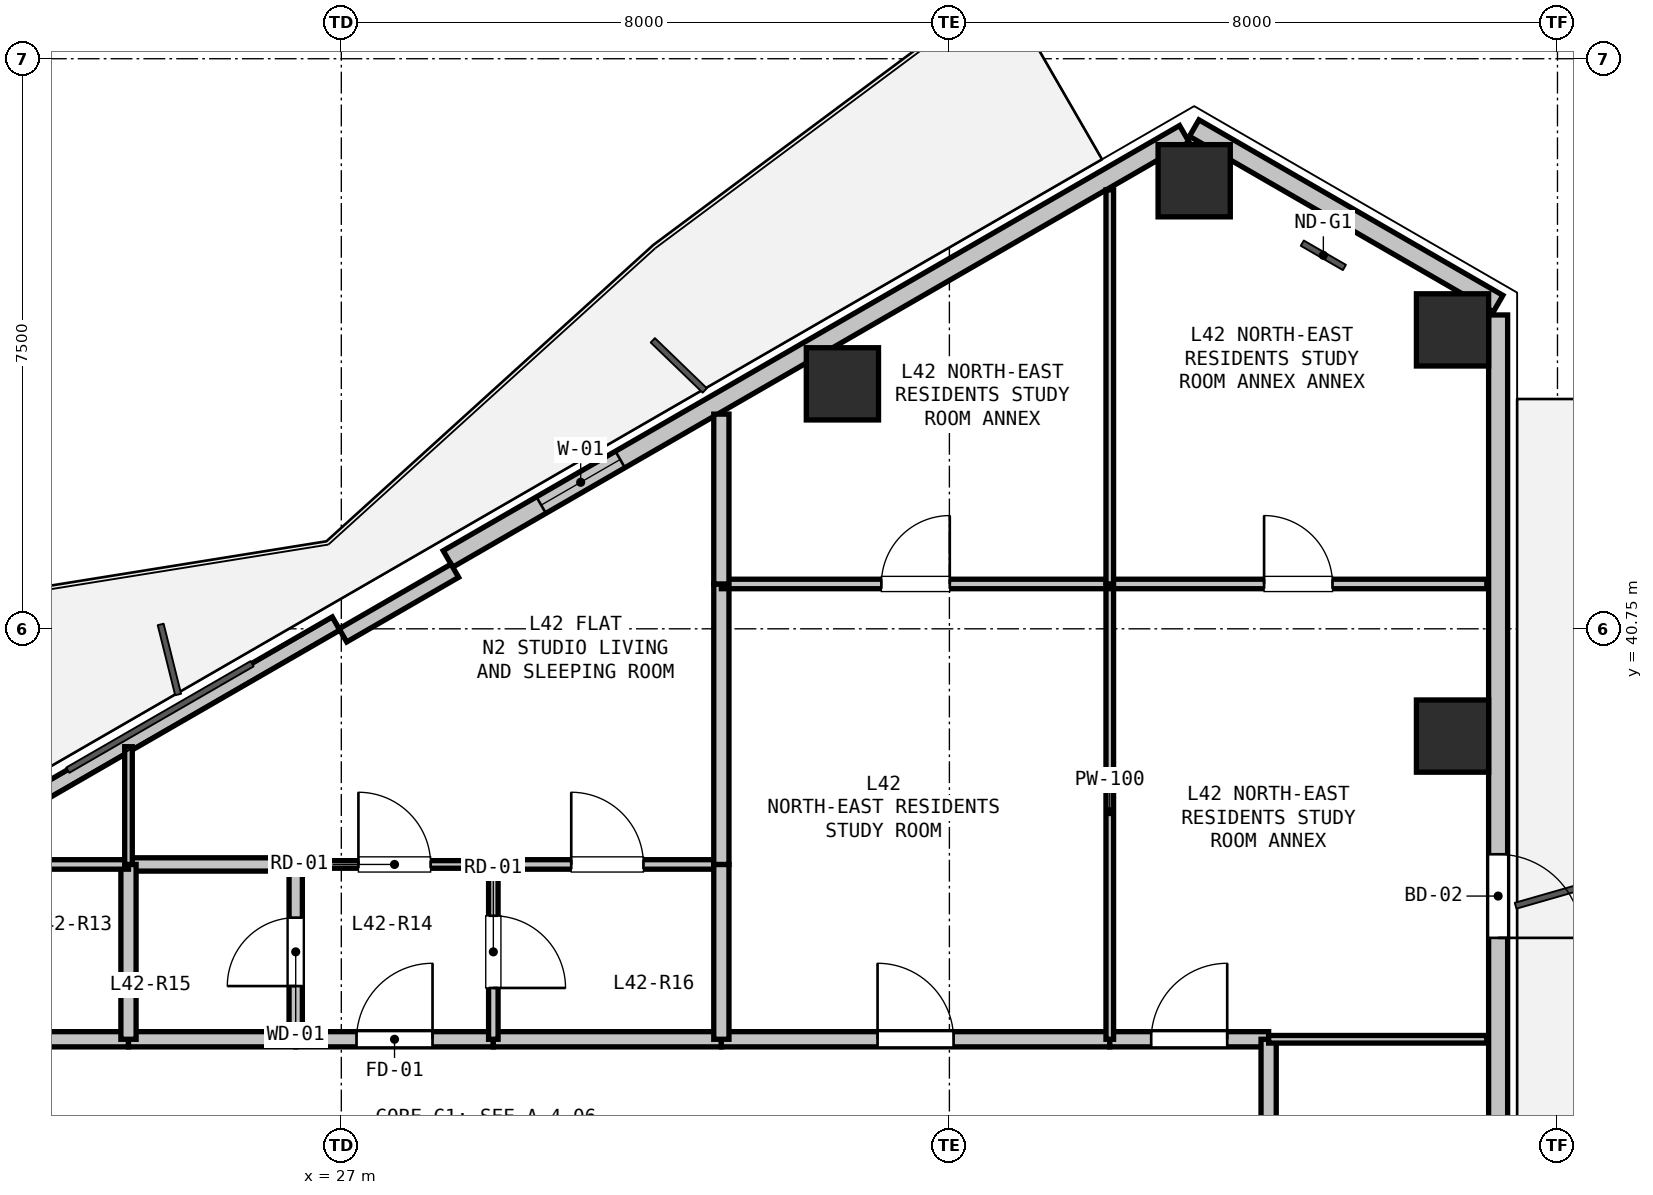
"""IFC4 building model, lengths in metres.
Left out: names, types, materials, properties, quantities, classifications, styles, units other than length and angle.
Written with IfcOpenShell. Run it as: python <this file> out.ifc"""

import sys

from ifc_helpers import new_model, si_unit, direction, frame, frame_2d, origin, origin_2d, place, context, subcontext, project, spatial, rectangle, hollow_rectangle, extrude, element, fill, save


model = new_model("IFC4")
c1 = context("Model", 3, precision=1e-05, world=origin(), true_north=direction((0.0, 1.0)))
c2 = subcontext(c1, "Body", "Model", "MODEL_VIEW")
j1 = project(units=[si_unit("LENGTHUNIT", "METRE"), si_unit("PLANEANGLEUNIT", "RADIAN")], contexts=[c1])
p1 = place(None, origin())
s1 = spatial("IfcSite", under=j1, at=p1, CompositionType="ELEMENT")
p2 = place(p1, origin())
s2 = spatial("IfcBuilding", under=s1, at=p2, CompositionType="ELEMENT")
p3 = place(p2, frame((0.0, 0.0, 150.9)))
s3 = spatial("IfcBuildingStorey", under=s2, at=p3, CompositionType="ELEMENT", Elevation=150.9)
for number, where, z_axis, x_axis in (
    (1, (33.593, 43.973, 0.0), (0.0, 0.0, 1.0), (1.0, 0.0, 0.0)),
    (2, (38.22, 46.645, 0.0), (0.0, 0.0, 1.0), (1.0, 0.0, 0.0)),
    (3, (41.619, 44.683, 0.0), (0.0, 0.0, 1.0), (1.0, 0.0, 0.0)),
    (4, (41.619, 39.339, 0.0), (0.0, 0.0, 1.0), (1.0, 0.0, 0.0)),
):
    element("IfcColumn", number, at=place(p3, frame(where, z_axis=z_axis, x_axis=x_axis)), inside=s3, PredefinedType="COLUMN", context=c2, shape_type="SweptSolid", body=[
        extrude(hollow_rectangle(XDim=0.95, YDim=0.95, WallThickness=0.028, at=origin_2d()), origin(), (0.0, 0.0, 1.0), 3.3),
    ])
p4 = place(p3, frame((38.22, 47.338, 0.0), z_axis=(0.0, 0.0, 1.0), x_axis=(0.866035021055, -0.499983342029, 0.0)))
e5 = element("IfcWall", 5, at=p4, inside=s3, PredefinedType="SOLIDWALL", context=c2, shape_type="SweptSolid", body=[
    extrude(rectangle(XDim=4.617, YDim=0.25, at=frame_2d((2.309, 0.0))), origin(), (0.0, 0.0, 1.0), 2.68),
])
p5 = place(p3, frame((17.85, 35.577, 0.0), z_axis=(0.0, 0.0, 1.0), x_axis=(0.866026619769, 0.499997893847, 0.0)))
e6 = element("IfcWall", 6, at=p5, inside=s3, PredefinedType="PARAPET", context=c2, shape_type="SweptSolid", body=[
    extrude(rectangle(XDim=10.486, YDim=0.2, at=frame_2d((5.243, 0.0))), origin(), (0.0, 0.0, 1.0), 0.2),
])
p6 = place(p3, frame((28.403, 41.67, 0.0), z_axis=(0.0, 0.0, 1.0), x_axis=(0.86602239209, 0.500005216371, 0.0)))
e7 = element("IfcWall", 7, at=p6, inside=s3, PredefinedType="SOLIDWALL", context=c2, shape_type="SweptSolid", body=[
    extrude(rectangle(XDim=11.186, YDim=0.25, at=frame_2d((5.593, 0.0))), origin(), (0.0, 0.0, 1.0), 2.68),
])
p7 = place(p6, frame((1.416, 0.0, 0.9)))
e8 = element("IfcOpeningElement", 8, at=p7, cuts=e7, PredefinedType="OPENING", context=c2, shape_type="SweptSolid", body=[
    extrude(rectangle(XDim=1.2, YDim=1.4, at=frame_2d((0.6, 0.7))), frame((0.0, 0.135, 0.0), z_axis=(0.0, -1.0, 0.0), x_axis=(1.0, 0.0, 0.0)), (0.0, 0.0, 1.0), 0.27),
])
p8 = place(p3, frame((27.021, 40.664, 0.0), z_axis=(0.0, 0.0, 1.0), x_axis=(0.86605165483, 0.499954529098, 0.0)))
e9 = element("IfcWall", 9, at=p8, inside=s3, PredefinedType="PARAPET", context=c2, shape_type="SweptSolid", body=[
    extrude(rectangle(XDim=1.7, YDim=0.2, at=frame_2d((0.85, 0.0))), origin(), (0.0, 0.0, 1.0), 2.68),
])
p9 = place(p3, frame((42.219, 44.879, 0.0), z_axis=(0.0, 0.0, 1.0), x_axis=(0.0, -1.0, 0.0)))
e10 = element("IfcWall", 10, at=p9, inside=s3, PredefinedType="SOLIDWALL", context=c2, shape_type="SweptSolid", body=[
    extrude(rectangle(XDim=11.186, YDim=0.25, at=frame_2d((5.593, 0.0))), origin(), (0.0, 0.0, 1.0), 2.68),
])
p10 = place(p9, frame((7.095, 0.0, 0.0)))
e11 = element("IfcOpeningElement", 11, at=p10, cuts=e10, PredefinedType="OPENING", context=c2, shape_type="SweptSolid", body=[
    extrude(rectangle(XDim=1.1, YDim=2.1, at=frame_2d((0.55, 1.05))), frame((0.0, 0.135, 0.0), z_axis=(0.0, -1.0, 0.0), x_axis=(1.0, 0.0, 0.0)), (0.0, 0.0, 1.0), 0.27),
])
p11 = place(p3, frame((21.0, 35.35, 0.0), z_axis=(0.0, 0.0, 1.0), x_axis=(1.0, 0.0, 0.0)))
e12 = element("IfcWall", 12, at=p11, inside=s3, PredefinedType="PARTITIONING", context=c2, shape_type="SweptSolid", body=[
    extrude(rectangle(XDim=3.2, YDim=0.2, at=frame_2d((1.6, 0.0))), origin(), (0.0, 0.0, 1.0), 3.06),
])
p12 = place(p11, frame((1.1, 0.0, 0.0)))
e13 = element("IfcOpeningElement", 13, at=p12, cuts=e12, PredefinedType="OPENING", context=c2, shape_type="SweptSolid", body=[
    extrude(rectangle(XDim=1.0, YDim=2.15, at=frame_2d((0.5, 1.075))), frame((0.0, 0.11, 0.0), z_axis=(0.0, -1.0, 0.0), x_axis=(1.0, 0.0, 0.0)), (0.0, 0.0, 1.0), 0.22),
])
p13 = place(p3, frame((24.2, 35.35, 0.0), z_axis=(0.0, 0.0, 1.0), x_axis=(1.0, 0.0, 0.0)))
e14 = element("IfcWall", 14, at=p13, inside=s3, PredefinedType="PARTITIONING", context=c2, shape_type="SweptSolid", body=[
    extrude(rectangle(XDim=2.2, YDim=0.2, at=frame_2d((1.1, 0.0))), origin(), (0.0, 0.0, 1.0), 3.06),
])
p14 = place(p3, frame((26.4, 35.35, 0.0), z_axis=(0.0, 0.0, 1.0), x_axis=(1.0, 0.0, 0.0)))
e15 = element("IfcWall", 15, at=p14, inside=s3, PredefinedType="PARTITIONING", context=c2, shape_type="SweptSolid", body=[
    extrude(rectangle(XDim=2.6, YDim=0.2, at=frame_2d((1.3, 0.0))), origin(), (0.0, 0.0, 1.0), 3.06),
])
p15 = place(p14, frame((0.8, 0.0, 0.0)))
e16 = element("IfcOpeningElement", 16, at=p15, cuts=e15, PredefinedType="OPENING", context=c2, shape_type="SweptSolid", body=[
    extrude(rectangle(XDim=1.0, YDim=2.15, at=frame_2d((0.5, 1.075))), frame((0.0, 0.11, 0.0), z_axis=(0.0, -1.0, 0.0), x_axis=(1.0, 0.0, 0.0)), (0.0, 0.0, 1.0), 0.22),
])
p16 = place(p3, frame((29.0, 35.35, 0.0), z_axis=(0.0, 0.0, 1.0), x_axis=(1.0, 0.0, 0.0)))
e17 = element("IfcWall", 17, at=p16, inside=s3, PredefinedType="PARTITIONING", context=c2, shape_type="SweptSolid", body=[
    extrude(rectangle(XDim=3.0, YDim=0.2, at=frame_2d((1.5, 0.0))), origin(), (0.0, 0.0, 1.0), 3.06),
])
p17 = place(p3, frame((32.0, 35.35, 0.0), z_axis=(0.0, 0.0, 1.0), x_axis=(1.0, 0.0, 0.0)))
e18 = element("IfcWall", 18, at=p17, inside=s3, PredefinedType="PARTITIONING", context=c2, shape_type="SweptSolid", body=[
    extrude(rectangle(XDim=5.11, YDim=0.2, at=frame_2d((2.555, 0.0))), origin(), (0.0, 0.0, 1.0), 2.433),
])
p18 = place(p17, frame((2.055, 0.0, 0.0)))
e19 = element("IfcOpeningElement", 19, at=p18, cuts=e18, PredefinedType="OPENING", context=c2, shape_type="SweptSolid", body=[
    extrude(rectangle(XDim=1.0, YDim=2.15, at=frame_2d((0.5, 1.075))), frame((0.0, 0.11, 0.0), z_axis=(0.0, -1.0, 0.0), x_axis=(1.0, 0.0, 0.0)), (0.0, 0.0, 1.0), 0.22),
])
p19 = place(p3, frame((37.11, 35.35, 0.0), z_axis=(0.0, 0.0, 1.0), x_axis=(1.0, 0.0, 0.0)))
e20 = element("IfcWall", 20, at=p19, inside=s3, PredefinedType="PARTITIONING", context=c2, shape_type="SweptSolid", body=[
    extrude(rectangle(XDim=2.09, YDim=0.2, at=frame_2d((1.045, 0.0))), origin(), (0.0, 0.0, 1.0), 2.433),
])
p20 = place(p19, frame((0.545, 0.0, 0.0)))
e21 = element("IfcOpeningElement", 21, at=p20, cuts=e20, PredefinedType="OPENING", context=c2, shape_type="SweptSolid", body=[
    extrude(rectangle(XDim=1.0, YDim=2.15, at=frame_2d((0.5, 1.075))), frame((0.0, 0.11, 0.0), z_axis=(0.0, -1.0, 0.0), x_axis=(1.0, 0.0, 0.0)), (0.0, 0.0, 1.0), 0.22),
])
p21 = place(p3, frame((39.2, 35.35, 0.0), z_axis=(0.0, 0.0, 1.0), x_axis=(0.0, -1.0, 0.0)))
e22 = element("IfcWall", 22, at=p21, inside=s3, PredefinedType="PARTITIONING", context=c2, shape_type="SweptSolid", body=[
    extrude(rectangle(XDim=1.75, YDim=0.2, at=frame_2d((0.875, 0.0))), origin(), (0.0, 0.0, 1.0), 3.06),
])
p22 = place(p3, frame((26.4, 37.65, 0.0), z_axis=(0.0, 0.0, 1.0), x_axis=(1.0, 0.0, 0.0)))
e23 = element("IfcWall", 23, at=p22, inside=s3, PredefinedType="PARTITIONING", context=c2, shape_type="SweptSolid", body=[
    extrude(rectangle(XDim=2.6, YDim=0.1, at=frame_2d((1.3, 0.0))), origin(), (0.0, 0.0, 1.0), 3.06),
])
p23 = place(p22, frame((0.825, 0.0, 0.0)))
e24 = element("IfcOpeningElement", 24, at=p23, cuts=e23, PredefinedType="OPENING", context=c2, shape_type="SweptSolid", body=[
    extrude(rectangle(XDim=0.95, YDim=2.1, at=frame_2d((0.475, 1.05))), frame((0.0, 0.06, 0.0), z_axis=(0.0, -1.0, 0.0), x_axis=(1.0, 0.0, 0.0)), (0.0, 0.0, 1.0), 0.12),
])
p24 = place(p3, frame((29.0, 37.65, 0.0), z_axis=(0.0, 0.0, 1.0), x_axis=(0.0, -1.0, 0.0)))
e25 = element("IfcWall", 25, at=p24, inside=s3, PredefinedType="PARTITIONING", context=c2, shape_type="SweptSolid", body=[
    extrude(rectangle(XDim=2.3, YDim=0.125, at=frame_2d((1.15, 0.0))), origin(), (0.0, 0.0, 1.0), 3.06),
])
p25 = place(p24, frame((0.675, 0.0, 0.0)))
e26 = element("IfcOpeningElement", 26, at=p25, cuts=e25, PredefinedType="OPENING", context=c2, shape_type="SweptSolid", body=[
    extrude(rectangle(XDim=0.95, YDim=2.1, at=frame_2d((0.475, 1.05))), frame((0.0, 0.073, 0.0), z_axis=(0.0, -1.0, 0.0), x_axis=(1.0, 0.0, 0.0)), (0.0, 0.0, 1.0), 0.145),
])
p26 = place(p3, frame((26.4, 35.35, 0.0), z_axis=(0.0, 0.0, 1.0), x_axis=(0.0, 1.0, 0.0)))
e27 = element("IfcWall", 27, at=p26, inside=s3, PredefinedType="PLUMBINGWALL", context=c2, shape_type="SweptSolid", body=[
    extrude(rectangle(XDim=2.3, YDim=0.175, at=frame_2d((1.15, 0.0))), origin(), (0.0, 0.0, 1.0), 3.06),
])
p27 = place(p26, frame((0.7, 0.0, 0.0)))
e28 = element("IfcOpeningElement", 28, at=p27, cuts=e27, PredefinedType="OPENING", context=c2, shape_type="SweptSolid", body=[
    extrude(rectangle(XDim=0.9, YDim=2.1, at=frame_2d((0.45, 1.05))), frame((0.0, 0.097, 0.0), z_axis=(0.0, -1.0, 0.0), x_axis=(1.0, 0.0, 0.0)), (0.0, 0.0, 1.0), 0.195),
])
p28 = place(p3, frame((24.2, 37.65, 0.0), z_axis=(0.0, 0.0, 1.0), x_axis=(1.0, 0.0, 0.0)))
e29 = element("IfcWall", 29, at=p28, inside=s3, PredefinedType="PLUMBINGWALL", context=c2, shape_type="SweptSolid", body=[
    extrude(rectangle(XDim=2.2, YDim=0.175, at=frame_2d((1.1, 0.0))), origin(), (0.0, 0.0, 1.0), 3.06),
])
p29 = place(p3, frame((24.2, 35.35, 0.0), z_axis=(0.0, 0.0, 1.0), x_axis=(0.0, 1.0, 0.0)))
e30 = element("IfcWall", 30, at=p29, inside=s3, PredefinedType="PARTITIONING", context=c2, shape_type="SweptSolid", body=[
    extrude(rectangle(XDim=2.3, YDim=0.2, at=frame_2d((1.15, 0.0))), origin(), (0.0, 0.0, 1.0), 3.06),
])
p30 = place(p3, frame((29.0, 37.65, 0.0), z_axis=(0.0, 0.0, 1.0), x_axis=(1.0, 0.0, 0.0)))
e31 = element("IfcWall", 31, at=p30, inside=s3, PredefinedType="PARTITIONING", context=c2, shape_type="SweptSolid", body=[
    extrude(rectangle(XDim=3.0, YDim=0.125, at=frame_2d((1.5, 0.0))), origin(), (0.0, 0.0, 1.0), 3.06),
])
p31 = place(p30, frame((1.025, 0.0, 0.0)))
e32 = element("IfcOpeningElement", 32, at=p31, cuts=e31, PredefinedType="OPENING", context=c2, shape_type="SweptSolid", body=[
    extrude(rectangle(XDim=0.95, YDim=2.1, at=frame_2d((0.475, 1.05))), frame((0.0, 0.073, 0.0), z_axis=(0.0, -1.0, 0.0), x_axis=(1.0, 0.0, 0.0)), (0.0, 0.0, 1.0), 0.145),
])
p32 = place(p3, frame((32.0, 37.65, 0.0), z_axis=(0.0, 0.0, 1.0), x_axis=(0.0, -1.0, 0.0)))
e33 = element("IfcWall", 33, at=p32, inside=s3, PredefinedType="PARTITIONING", context=c2, shape_type="SweptSolid", body=[
    extrude(rectangle(XDim=2.3, YDim=0.2, at=frame_2d((1.15, 0.0))), origin(), (0.0, 0.0, 1.0), 3.06),
])
p33 = place(p3, frame((32.0, 37.65, 0.0), z_axis=(0.0, 0.0, 1.0), x_axis=(0.0, 1.0, 0.0)))
e34 = element("IfcWall", 34, at=p33, inside=s3, PredefinedType="PARTITIONING", context=c2, shape_type="SweptSolid", body=[
    extrude(rectangle(XDim=3.69, YDim=0.2, at=frame_2d((1.845, 0.0))), origin(), (0.0, 0.0, 1.0), 3.06),
])
p34 = place(p3, frame((32.0, 41.34, 0.0), z_axis=(0.0, 0.0, 1.0), x_axis=(1.0, 0.0, 0.0)))
e35 = element("IfcWall", 35, at=p34, inside=s3, PredefinedType="PARTITIONING", context=c2, shape_type="SweptSolid", body=[
    extrude(rectangle(XDim=5.11, YDim=0.125, at=frame_2d((2.555, 0.0))), origin(), (0.0, 0.0, 1.0), 3.06),
])
p35 = place(p34, frame((2.105, 0.0, 0.0)))
e36 = element("IfcOpeningElement", 36, at=p35, cuts=e35, PredefinedType="OPENING", context=c2, shape_type="SweptSolid", body=[
    extrude(rectangle(XDim=0.9, YDim=2.1, at=frame_2d((0.45, 1.05))), frame((0.0, 0.073, 0.0), z_axis=(0.0, -1.0, 0.0), x_axis=(1.0, 0.0, 0.0)), (0.0, 0.0, 1.0), 0.145),
])
p36 = place(p3, frame((37.11, 41.34, 0.0), z_axis=(0.0, 0.0, 1.0), x_axis=(0.0, -1.0, 0.0)))
e37 = element("IfcWall", 37, at=p36, inside=s3, PredefinedType="PARTITIONING", context=c2, shape_type="SweptSolid", body=[
    extrude(rectangle(XDim=5.99, YDim=0.1, at=frame_2d((2.995, 0.0))), origin(), (0.0, 0.0, 1.0), 2.433),
])
p37 = place(p3, frame((37.11, 41.34, 0.0), z_axis=(0.0, 0.0, 1.0), x_axis=(1.0, 0.0, 0.0)))
e38 = element("IfcWall", 38, at=p37, inside=s3, PredefinedType="PARTITIONING", context=c2, shape_type="SweptSolid", body=[
    extrude(rectangle(XDim=4.96, YDim=0.125, at=frame_2d((2.48, 0.0))), origin(), (0.0, 0.0, 1.0), 2.433),
])
p38 = place(p37, frame((2.03, 0.0, 0.0)))
e39 = element("IfcOpeningElement", 39, at=p38, cuts=e38, PredefinedType="OPENING", context=c2, shape_type="SweptSolid", body=[
    extrude(rectangle(XDim=0.9, YDim=2.1, at=frame_2d((0.45, 1.05))), frame((0.0, 0.073, 0.0), z_axis=(0.0, -1.0, 0.0), x_axis=(1.0, 0.0, 0.0)), (0.0, 0.0, 1.0), 0.145),
])
p39 = place(p3, frame((42.07, 35.35, 0.0), z_axis=(0.0, 0.0, 1.0), x_axis=(-1.0, 0.0, 0.0)))
e40 = element("IfcWall", 40, at=p39, inside=s3, PredefinedType="PARTITIONING", context=c2, shape_type="SweptSolid", body=[
    extrude(rectangle(XDim=2.87, YDim=0.1, at=frame_2d((1.435, 0.0))), origin(), (0.0, 0.0, 1.0), 2.365),
])
p40 = place(p3, frame((32.0, 41.34, 0.0), z_axis=(0.0, 0.0, 1.0), x_axis=(0.0, 1.0, 0.0)))
e41 = element("IfcWall", 41, at=p40, inside=s3, PredefinedType="PARTITIONING", context=c2, shape_type="SweptSolid", body=[
    extrude(rectangle(XDim=2.234, YDim=0.2, at=frame_2d((1.117, 0.0))), origin(), (0.0, 0.0, 1.0), 2.365),
])
p41 = place(p3, frame((37.11, 46.524, 0.0), z_axis=(0.0, 0.0, 1.0), x_axis=(0.0, -1.0, 0.0)))
e42 = element("IfcWall", 42, at=p41, inside=s3, PredefinedType="PARTITIONING", context=c2, shape_type="SweptSolid", body=[
    extrude(rectangle(XDim=5.184, YDim=0.1, at=frame_2d((2.592, 0.0))), origin(), (0.0, 0.0, 1.0), 2.725),
])
p42 = place(p3, frame((21.51, 37.65, 0.0), z_axis=(0.0, 0.0, 1.0), x_axis=(1.0, 0.0, 0.0)))
e43 = element("IfcWall", 43, at=p42, inside=s3, PredefinedType="PARTITIONING", context=c2, shape_type="SweptSolid", body=[
    extrude(rectangle(XDim=2.69, YDim=0.125, at=frame_2d((1.345, 0.0))), origin(), (0.0, 0.0, 1.0), 2.365),
])
p43 = place(p3, frame((24.2, 37.65, 0.0), z_axis=(0.0, 0.0, 1.0), x_axis=(0.0, 1.0, 0.0)))
e44 = element("IfcWall", 44, at=p43, inside=s3, PredefinedType="PARTITIONING", context=c2, shape_type="SweptSolid", body=[
    extrude(rectangle(XDim=1.549, YDim=0.1, at=frame_2d((0.774, 0.0))), origin(), (0.0, 0.0, 1.0), 2.365),
])
p44 = place(p7, origin())
e45 = element("IfcWindow", 45, at=p44, inside=s3, PartitioningType="SINGLE_PANEL", PredefinedType="WINDOW", context=c2, shape_type="SweptSolid", body=[
    extrude(rectangle(XDim=1.2, YDim=1.4, at=frame_2d((0.6, 0.7))), frame((0.0, 0.03, 0.0), z_axis=(0.0, -1.0, 0.0), x_axis=(1.0, 0.0, 0.0)), (0.0, 0.0, 1.0), 0.06),
])
fill(e8, e45)
p45 = place(p10, origin())
e46 = element("IfcDoor", 46, at=p45, inside=s3, OperationType="SINGLE_SWING_RIGHT", PredefinedType="DOOR", context=c2, shape_type="SweptSolid", body=[
    extrude(rectangle(XDim=1.1, YDim=2.1, at=frame_2d((0.55, 1.05))), frame((0.0, 0.025, 0.0), z_axis=(0.0, -1.0, 0.0), x_axis=(1.0, 0.0, 0.0)), (0.0, 0.0, 1.0), 0.05),
])
fill(e11, e46)
p46 = place(p15, origin())
e47 = element("IfcDoor", 47, at=p46, inside=s3, OperationType="SINGLE_SWING_RIGHT", PredefinedType="DOOR", context=c2, shape_type="SweptSolid", body=[
    extrude(rectangle(XDim=1.0, YDim=2.15, at=frame_2d((0.5, 1.075))), frame((0.0, 0.025, 0.0), z_axis=(0.0, -1.0, 0.0), x_axis=(1.0, 0.0, 0.0)), (0.0, 0.0, 1.0), 0.05),
])
fill(e16, e47)
p47 = place(p18, origin())
e48 = element("IfcDoor", 48, at=p47, inside=s3, OperationType="SINGLE_SWING_LEFT", PredefinedType="DOOR", context=c2, shape_type="SweptSolid", body=[
    extrude(rectangle(XDim=1.0, YDim=2.15, at=frame_2d((0.5, 1.075))), frame((0.0, 0.025, 0.0), z_axis=(0.0, -1.0, 0.0), x_axis=(1.0, 0.0, 0.0)), (0.0, 0.0, 1.0), 0.05),
])
fill(e19, e48)
p48 = place(p20, origin())
e49 = element("IfcDoor", 49, at=p48, inside=s3, OperationType="SINGLE_SWING_RIGHT", PredefinedType="DOOR", context=c2, shape_type="SweptSolid", body=[
    extrude(rectangle(XDim=1.0, YDim=2.15, at=frame_2d((0.5, 1.075))), frame((0.0, 0.025, 0.0), z_axis=(0.0, -1.0, 0.0), x_axis=(1.0, 0.0, 0.0)), (0.0, 0.0, 1.0), 0.05),
])
fill(e21, e49)
p49 = place(p27, origin())
e50 = element("IfcDoor", 50, at=p49, inside=s3, OperationType="SINGLE_SWING_LEFT", PredefinedType="DOOR", context=c2, shape_type="SweptSolid", body=[
    extrude(rectangle(XDim=0.9, YDim=2.1, at=frame_2d((0.45, 1.05))), frame((0.0, 0.025, 0.0), z_axis=(0.0, -1.0, 0.0), x_axis=(1.0, 0.0, 0.0)), (0.0, 0.0, 1.0), 0.05),
])
fill(e28, e50)
p50 = place(p25, origin())
e51 = element("IfcDoor", 51, at=p50, inside=s3, OperationType="SINGLE_SWING_RIGHT", PredefinedType="DOOR", context=c2, shape_type="SweptSolid", body=[
    extrude(rectangle(XDim=0.95, YDim=2.1, at=frame_2d((0.475, 1.05))), frame((0.0, 0.025, 0.0), z_axis=(0.0, -1.0, 0.0), x_axis=(1.0, 0.0, 0.0)), (0.0, 0.0, 1.0), 0.05),
])
fill(e26, e51)
p51 = place(p23, origin())
e52 = element("IfcDoor", 52, at=p51, inside=s3, OperationType="SINGLE_SWING_LEFT", PredefinedType="DOOR", context=c2, shape_type="SweptSolid", body=[
    extrude(rectangle(XDim=0.95, YDim=2.1, at=frame_2d((0.475, 1.05))), frame((0.0, 0.025, 0.0), z_axis=(0.0, -1.0, 0.0), x_axis=(1.0, 0.0, 0.0)), (0.0, 0.0, 1.0), 0.05),
])
fill(e24, e52)
p52 = place(p31, origin())
e53 = element("IfcDoor", 53, at=p52, inside=s3, OperationType="SINGLE_SWING_LEFT", PredefinedType="DOOR", context=c2, shape_type="SweptSolid", body=[
    extrude(rectangle(XDim=0.95, YDim=2.1, at=frame_2d((0.475, 1.05))), frame((0.0, 0.025, 0.0), z_axis=(0.0, -1.0, 0.0), x_axis=(1.0, 0.0, 0.0)), (0.0, 0.0, 1.0), 0.05),
])
fill(e32, e53)
p53 = place(p35, origin())
e54 = element("IfcDoor", 54, at=p53, inside=s3, OperationType="SINGLE_SWING_RIGHT", PredefinedType="DOOR", context=c2, shape_type="SweptSolid", body=[
    extrude(rectangle(XDim=0.9, YDim=2.1, at=frame_2d((0.45, 1.05))), frame((0.0, 0.025, 0.0), z_axis=(0.0, -1.0, 0.0), x_axis=(1.0, 0.0, 0.0)), (0.0, 0.0, 1.0), 0.05),
])
fill(e36, e54)
p54 = place(p38, origin())
e55 = element("IfcDoor", 55, at=p54, inside=s3, OperationType="SINGLE_SWING_LEFT", PredefinedType="DOOR", context=c2, shape_type="SweptSolid", body=[
    extrude(rectangle(XDim=0.9, YDim=2.1, at=frame_2d((0.45, 1.05))), frame((0.0, 0.025, 0.0), z_axis=(0.0, -1.0, 0.0), x_axis=(1.0, 0.0, 0.0)), (0.0, 0.0, 1.0), 0.05),
])
fill(e39, e55)
save(model, sys.argv[1])
